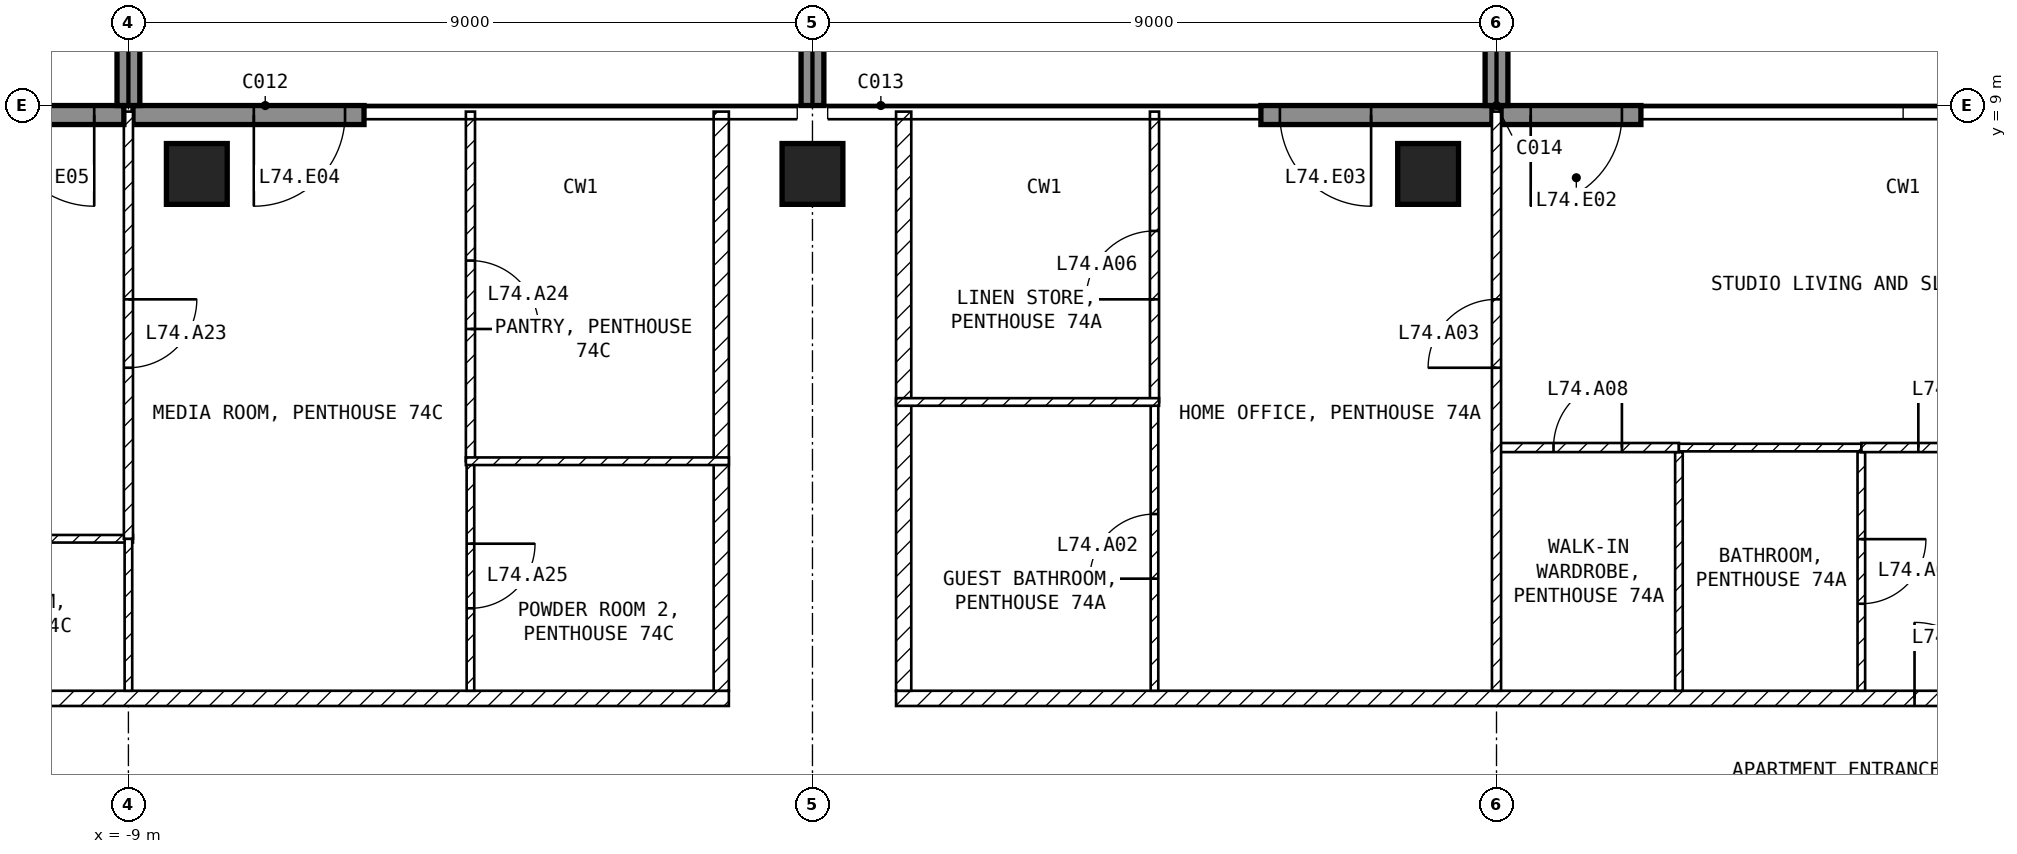
"""IFC4 building model, lengths in metres.
Left out: names, types, materials, properties, quantities, classifications, styles, units other than length and angle.
Written with IfcOpenShell. Run it as: python <this file> out.ifc"""

import sys

from ifc_helpers import new_model, si_unit, direction, frame, frame_2d, origin, origin_2d, place, context, subcontext, project, spatial, rectangle, extrude, element, fill, save


model = new_model("IFC4")
c1 = context("Model", 3, precision=1e-05, world=origin(), true_north=direction((0.0, 1.0)))
c2 = subcontext(c1, "Body", "Model", "MODEL_VIEW")
j1 = project(units=[si_unit("LENGTHUNIT", "METRE"), si_unit("PLANEANGLEUNIT", "RADIAN")], contexts=[c1])
p1 = place(None, origin())
s1 = spatial("IfcSite", under=j1, at=p1, CompositionType="ELEMENT")
p2 = place(p1, origin())
s2 = spatial("IfcBuilding", under=s1, at=p2, CompositionType="ELEMENT")
p3 = place(p2, frame((0.0, 0.0, 290.4)))
s3 = spatial("IfcBuildingStorey", under=s2, at=p3, CompositionType="ELEMENT", Elevation=290.4)
for number, where, z_axis, x_axis in (
    (1, (-8.1, 8.1, -0.25), (0.0, 0.0, 1.0), (1.0, 0.0, 0.0)),
    (2, (0.0, 8.1, -0.25), (0.0, 0.0, 1.0), (1.0, 0.0, 0.0)),
    (3, (8.1, 8.1, -0.25), (0.0, 0.0, 1.0), (1.0, 0.0, 0.0)),
):
    element("IfcColumn", number, at=place(p3, frame(where, z_axis=z_axis, x_axis=x_axis)), inside=s3, PredefinedType="COLUMN", context=c2, shape_type="SweptSolid", body=[
        extrude(rectangle(XDim=0.8, YDim=0.8, at=origin_2d()), origin(), (0.0, 0.0, 1.0), 4.2),
    ])
p4 = place(p3, frame((10.9, 8.875, 0.0), z_axis=(0.0, 0.0, 1.0), x_axis=(-1.0, 0.0, 0.0)))
e4 = element("IfcWall", 4, at=p4, inside=s3, PredefinedType="SOLIDWALL", context=c2, shape_type="SweptSolid", body=[
    extrude(rectangle(XDim=1.84, YDim=0.25, at=frame_2d((0.92, 0.0))), origin(), (0.0, 0.0, 1.0), 3.95),
])
p5 = place(p4, frame((0.25, 0.0, 0.0)))
e5 = element("IfcOpeningElement", 5, at=p5, cuts=e4, PredefinedType="OPENING", context=c2, shape_type="SweptSolid", body=[
    extrude(rectangle(XDim=1.2, YDim=2.4, at=frame_2d((0.6, 1.2))), frame((0.0, 0.135, 0.0), z_axis=(0.0, -1.0, 0.0), x_axis=(1.0, 0.0, 0.0)), (0.0, 0.0, 1.0), 0.27),
])
p6 = place(p3, frame((8.94, 8.875, 0.0), z_axis=(0.0, 0.0, 1.0), x_axis=(-1.0, 0.0, 0.0)))
e6 = element("IfcWall", 6, at=p6, inside=s3, PredefinedType="SOLIDWALL", context=c2, shape_type="SweptSolid", body=[
    extrude(rectangle(XDim=3.04, YDim=0.25, at=frame_2d((1.52, 0.0))), origin(), (0.0, 0.0, 1.0), 3.95),
])
p7 = place(p6, frame((1.59, 0.0, 0.0)))
e7 = element("IfcOpeningElement", 7, at=p7, cuts=e6, PredefinedType="OPENING", context=c2, shape_type="SweptSolid", body=[
    extrude(rectangle(XDim=1.2, YDim=2.4, at=frame_2d((0.6, 1.2))), frame((0.0, 0.135, 0.0), z_axis=(0.0, -1.0, 0.0), x_axis=(1.0, 0.0, 0.0)), (0.0, 0.0, 1.0), 0.27),
])
p8 = place(p3, frame((-5.9, 8.875, 0.0), z_axis=(0.0, 0.0, 1.0), x_axis=(-1.0, 0.0, 0.0)))
e8 = element("IfcWall", 8, at=p8, inside=s3, PredefinedType="SOLIDWALL", context=c2, shape_type="SweptSolid", body=[
    extrude(rectangle(XDim=3.04, YDim=0.25, at=frame_2d((1.52, 0.0))), origin(), (0.0, 0.0, 1.0), 3.95),
])
p9 = place(p8, frame((0.25, 0.0, 0.0)))
e9 = element("IfcOpeningElement", 9, at=p9, cuts=e8, PredefinedType="OPENING", context=c2, shape_type="SweptSolid", body=[
    extrude(rectangle(XDim=1.2, YDim=2.4, at=frame_2d((0.6, 1.2))), frame((0.0, 0.135, 0.0), z_axis=(0.0, -1.0, 0.0), x_axis=(1.0, 0.0, 0.0)), (0.0, 0.0, 1.0), 0.27),
])
p10 = place(p3, frame((-9.06, 8.875, 0.0), z_axis=(0.0, 0.0, 1.0), x_axis=(-1.0, 0.0, 0.0)))
e10 = element("IfcWall", 10, at=p10, inside=s3, PredefinedType="SOLIDWALL", context=c2, shape_type="SweptSolid", body=[
    extrude(rectangle(XDim=1.84, YDim=0.25, at=frame_2d((0.92, 0.0))), origin(), (0.0, 0.0, 1.0), 3.95),
])
p11 = place(p10, frame((0.39, 0.0, 0.0)))
e11 = element("IfcOpeningElement", 11, at=p11, cuts=e10, PredefinedType="OPENING", context=c2, shape_type="SweptSolid", body=[
    extrude(rectangle(XDim=1.2, YDim=2.4, at=frame_2d((0.6, 1.2))), frame((0.0, 0.135, 0.0), z_axis=(0.0, -1.0, 0.0), x_axis=(1.0, 0.0, 0.0)), (0.0, 0.0, 1.0), 0.27),
])
for number, where, z_axis, x_axis in (
    (12, (-9.0, 9.0, 0.0), (0.0, 0.0, 1.0), (0.0, 1.0, 0.0)),
    (13, (0.0, 9.0, 0.0), (0.0, 0.0, 1.0), (0.0, 1.0, 0.0)),
    (14, (9.0, 9.0, 0.0), (0.0, 0.0, 1.0), (0.0, 1.0, 0.0)),
):
    element("IfcWall", number, at=place(p3, frame(where, z_axis=z_axis, x_axis=x_axis)), inside=s3, PredefinedType="SOLIDWALL", context=c2, shape_type="SweptSolid", body=[
        extrude(rectangle(XDim=2.7, YDim=0.3, at=frame_2d((1.35, 0.0))), origin(), (0.0, 0.0, 1.0), 3.95),
    ])
p12 = place(p3, frame((1.1, 1.2, 0.0), z_axis=(0.0, 0.0, 1.0), x_axis=(1.0, 0.0, 0.0)))
e15 = element("IfcWall", 15, at=p12, inside=s3, PredefinedType="PARTITIONING", context=c2, shape_type="SweptSolid", body=[
    extrude(rectangle(XDim=20.5, YDim=0.2, at=frame_2d((10.25, 0.0))), origin(), (0.0, 0.0, 1.0), 3.95),
])
p13 = place(p12, frame((13.4, 0.0, 0.0)))
e16 = element("IfcOpeningElement", 16, at=p13, cuts=e15, PredefinedType="OPENING", context=c2, shape_type="SweptSolid", body=[
    extrude(rectangle(XDim=1.0, YDim=2.1, at=frame_2d((0.5, 1.05))), frame((0.0, 0.11, 0.0), z_axis=(0.0, -1.0, 0.0), x_axis=(1.0, 0.0, 0.0)), (0.0, 0.0, 1.0), 0.22),
])
p14 = place(p3, frame((1.2, 8.92, 0.0), z_axis=(0.0, 0.0, 1.0), x_axis=(0.0, -1.0, 0.0)))
e17 = element("IfcWall", 17, at=p14, inside=s3, PredefinedType="PARTITIONING", context=c2, shape_type="SweptSolid", body=[
    extrude(rectangle(XDim=7.62, YDim=0.2, at=frame_2d((3.81, 0.0))), origin(), (0.0, 0.0, 1.0), 3.95),
])
p15 = place(p3, frame((-21.6, 1.2, 0.0), z_axis=(0.0, 0.0, 1.0), x_axis=(1.0, 0.0, 0.0)))
e18 = element("IfcWall", 18, at=p15, inside=s3, PredefinedType="PARTITIONING", context=c2, shape_type="SweptSolid", body=[
    extrude(rectangle(XDim=20.5, YDim=0.2, at=frame_2d((10.25, 0.0))), origin(), (0.0, 0.0, 1.0), 3.95),
])
p16 = place(p15, frame((3.55, 0.0, 0.0)))
e19 = element("IfcOpeningElement", 19, at=p16, cuts=e18, PredefinedType="OPENING", context=c2, shape_type="SweptSolid", body=[
    extrude(rectangle(XDim=1.0, YDim=2.1, at=frame_2d((0.5, 1.05))), frame((0.0, 0.11, 0.0), z_axis=(0.0, -1.0, 0.0), x_axis=(1.0, 0.0, 0.0)), (0.0, 0.0, 1.0), 0.22),
])
p17 = place(p3, frame((-1.2, 1.3, 0.0), z_axis=(0.0, 0.0, 1.0), x_axis=(0.0, 1.0, 0.0)))
e20 = element("IfcWall", 20, at=p17, inside=s3, PredefinedType="PARTITIONING", context=c2, shape_type="SweptSolid", body=[
    extrude(rectangle(XDim=7.62, YDim=0.2, at=frame_2d((3.81, 0.0))), origin(), (0.0, 0.0, 1.0), 3.95),
])
p18 = place(p3, frame((11.4, 4.44, 0.0), z_axis=(0.0, 0.0, 1.0), x_axis=(0.0, -1.0, 0.0)))
e21 = element("IfcWall", 21, at=p18, inside=s3, PredefinedType="PARTITIONING", context=c2, shape_type="SweptSolid", body=[
    extrude(rectangle(XDim=3.14, YDim=0.1, at=frame_2d((1.57, 0.0))), origin(), (0.0, 0.0, 1.0), 3.95),
])
p19 = place(p3, frame((8.94, 4.5, 0.0), z_axis=(0.0, 0.0, 1.0), x_axis=(1.0, 0.0, 0.0)))
e22 = element("IfcWall", 22, at=p19, inside=s3, PredefinedType="PARTITIONING", context=c2, shape_type="SweptSolid", body=[
    extrude(rectangle(XDim=2.46, YDim=0.12, at=frame_2d((1.23, 0.0))), origin(), (0.0, 0.0, 1.0), 3.95),
])
p20 = place(p19, frame((0.81, 0.0, 0.0)))
e23 = element("IfcOpeningElement", 23, at=p20, cuts=e22, PredefinedType="OPENING", context=c2, shape_type="SweptSolid", body=[
    extrude(rectangle(XDim=0.9, YDim=2.1, at=frame_2d((0.45, 1.05))), frame((0.0, 0.07, 0.0), z_axis=(0.0, -1.0, 0.0), x_axis=(1.0, 0.0, 0.0)), (0.0, 0.0, 1.0), 0.14),
])
p21 = place(p3, frame((9.0, 1.3, 0.0), z_axis=(0.0, 0.0, 1.0), x_axis=(0.0, 1.0, 0.0)))
e24 = element("IfcWall", 24, at=p21, inside=s3, PredefinedType="PARTITIONING", context=c2, shape_type="SweptSolid", body=[
    extrude(rectangle(XDim=7.62, YDim=0.12, at=frame_2d((3.81, 0.0))), origin(), (0.0, 0.0, 1.0), 3.95),
])
p22 = place(p21, frame((4.25, 0.0, 0.0)))
e25 = element("IfcOpeningElement", 25, at=p22, cuts=e24, PredefinedType="OPENING", context=c2, shape_type="SweptSolid", body=[
    extrude(rectangle(XDim=0.9, YDim=2.1, at=frame_2d((0.45, 1.05))), frame((0.0, 0.07, 0.0), z_axis=(0.0, -1.0, 0.0), x_axis=(1.0, 0.0, 0.0)), (0.0, 0.0, 1.0), 0.14),
])
p23 = place(p3, frame((13.8, 4.44, 0.0), z_axis=(0.0, 0.0, 1.0), x_axis=(0.0, -1.0, 0.0)))
e26 = element("IfcWall", 26, at=p23, inside=s3, PredefinedType="PARTITIONING", context=c2, shape_type="SweptSolid", body=[
    extrude(rectangle(XDim=3.14, YDim=0.1, at=frame_2d((1.57, 0.0))), origin(), (0.0, 0.0, 1.0), 3.95),
])
p24 = place(p23, frame((1.145, 0.0, 0.0)))
e27 = element("IfcOpeningElement", 27, at=p24, cuts=e26, PredefinedType="OPENING", context=c2, shape_type="SweptSolid", body=[
    extrude(rectangle(XDim=0.85, YDim=2.1, at=frame_2d((0.425, 1.05))), frame((0.0, 0.06, 0.0), z_axis=(0.0, -1.0, 0.0), x_axis=(1.0, 0.0, 0.0)), (0.0, 0.0, 1.0), 0.12),
])
p25 = place(p3, frame((11.4, 4.5, 0.0), z_axis=(0.0, 0.0, 1.0), x_axis=(1.0, 0.0, 0.0)))
e28 = element("IfcWall", 28, at=p25, inside=s3, PredefinedType="PARTITIONING", context=c2, shape_type="SweptSolid", body=[
    extrude(rectangle(XDim=2.4, YDim=0.1, at=frame_2d((1.2, 0.0))), origin(), (0.0, 0.0, 1.0), 3.95),
])
p26 = place(p3, frame((13.8, 4.5, 0.0), z_axis=(0.0, 0.0, 1.0), x_axis=(1.0, 0.0, 0.0)))
e29 = element("IfcWall", 29, at=p26, inside=s3, PredefinedType="PARTITIONING", context=c2, shape_type="SweptSolid", body=[
    extrude(rectangle(XDim=7.8, YDim=0.12, at=frame_2d((3.9, 0.0))), origin(), (0.0, 0.0, 1.0), 3.95),
])
p27 = place(p26, frame((6.45, 0.0, 0.0)))
e30 = element("IfcOpeningElement", 30, at=p27, cuts=e29, PredefinedType="OPENING", context=c2, shape_type="SweptSolid", body=[
    extrude(rectangle(XDim=0.9, YDim=2.1, at=frame_2d((0.45, 1.05))), frame((0.0, 0.07, 0.0), z_axis=(0.0, -1.0, 0.0), x_axis=(1.0, 0.0, 0.0)), (0.0, 0.0, 1.0), 0.14),
])
p28 = place(p26, frame((0.75, 0.0, 0.0)))
e31 = element("IfcOpeningElement", 31, at=p28, cuts=e29, PredefinedType="OPENING", context=c2, shape_type="SweptSolid", body=[
    extrude(rectangle(XDim=0.9, YDim=2.1, at=frame_2d((0.45, 1.05))), frame((0.0, 0.07, 0.0), z_axis=(0.0, -1.0, 0.0), x_axis=(1.0, 0.0, 0.0)), (0.0, 0.0, 1.0), 0.14),
])
p29 = place(p3, frame((4.5, 1.3, 0.0), z_axis=(0.0, 0.0, 1.0), x_axis=(0.0, 1.0, 0.0)))
e32 = element("IfcWall", 32, at=p29, inside=s3, PredefinedType="PARTITIONING", context=c2, shape_type="SweptSolid", body=[
    extrude(rectangle(XDim=3.8, YDim=0.1, at=frame_2d((1.9, 0.0))), origin(), (0.0, 0.0, 1.0), 3.95),
])
p30 = place(p29, frame((1.475, 0.0, 0.0)))
e33 = element("IfcOpeningElement", 33, at=p30, cuts=e32, PredefinedType="OPENING", context=c2, shape_type="SweptSolid", body=[
    extrude(rectangle(XDim=0.85, YDim=2.1, at=frame_2d((0.425, 1.05))), frame((0.0, 0.06, 0.0), z_axis=(0.0, -1.0, 0.0), x_axis=(1.0, 0.0, 0.0)), (0.0, 0.0, 1.0), 0.12),
])
p31 = place(p3, frame((4.5, 5.1, 0.0), z_axis=(0.0, 0.0, 1.0), x_axis=(0.0, 1.0, 0.0)))
e34 = element("IfcWall", 34, at=p31, inside=s3, PredefinedType="PARTITIONING", context=c2, shape_type="SweptSolid", body=[
    extrude(rectangle(XDim=3.82, YDim=0.12, at=frame_2d((1.91, 0.0))), origin(), (0.0, 0.0, 1.0), 3.95),
])
p32 = place(p31, frame((1.35, 0.0, 0.0)))
e35 = element("IfcOpeningElement", 35, at=p32, cuts=e34, PredefinedType="OPENING", context=c2, shape_type="SweptSolid", body=[
    extrude(rectangle(XDim=0.9, YDim=2.1, at=frame_2d((0.45, 1.05))), frame((0.0, 0.07, 0.0), z_axis=(0.0, -1.0, 0.0), x_axis=(1.0, 0.0, 0.0)), (0.0, 0.0, 1.0), 0.14),
])
p33 = place(p3, frame((1.1, 5.1, 0.0), z_axis=(0.0, 0.0, 1.0), x_axis=(1.0, 0.0, 0.0)))
e36 = element("IfcWall", 36, at=p33, inside=s3, PredefinedType="PARTITIONING", context=c2, shape_type="SweptSolid", body=[
    extrude(rectangle(XDim=3.46, YDim=0.1, at=frame_2d((1.73, 0.0))), origin(), (0.0, 0.0, 1.0), 3.95),
])
p34 = place(p3, frame((-12.45, 3.3, 0.0), z_axis=(0.0, 0.0, 1.0), x_axis=(1.0, 0.0, 0.0)))
e37 = element("IfcWall", 37, at=p34, inside=s3, PredefinedType="PARTITIONING", context=c2, shape_type="SweptSolid", body=[
    extrude(rectangle(XDim=3.51, YDim=0.1, at=frame_2d((1.755, 0.0))), origin(), (0.0, 0.0, 1.0), 3.95),
])
p35 = place(p34, frame((1.3, 0.0, 0.0)))
e38 = element("IfcOpeningElement", 38, at=p35, cuts=e37, PredefinedType="OPENING", context=c2, shape_type="SweptSolid", body=[
    extrude(rectangle(XDim=0.85, YDim=2.1, at=frame_2d((0.425, 1.05))), frame((0.0, 0.06, 0.0), z_axis=(0.0, -1.0, 0.0), x_axis=(1.0, 0.0, 0.0)), (0.0, 0.0, 1.0), 0.12),
])
p36 = place(p3, frame((-9.0, 3.3, 0.0), z_axis=(0.0, 0.0, 1.0), x_axis=(0.0, -1.0, 0.0)))
e39 = element("IfcWall", 39, at=p36, inside=s3, PredefinedType="PARTITIONING", context=c2, shape_type="SweptSolid", body=[
    extrude(rectangle(XDim=2.0, YDim=0.1, at=frame_2d((1.0, 0.0))), origin(), (0.0, 0.0, 1.0), 3.95),
])
p37 = place(p3, frame((-9.0, 8.92, 0.0), z_axis=(0.0, 0.0, 1.0), x_axis=(0.0, -1.0, 0.0)))
e40 = element("IfcWall", 40, at=p37, inside=s3, PredefinedType="PARTITIONING", context=c2, shape_type="SweptSolid", body=[
    extrude(rectangle(XDim=5.62, YDim=0.12, at=frame_2d((2.81, 0.0))), origin(), (0.0, 0.0, 1.0), 3.95),
])
p38 = place(p37, frame((2.47, 0.0, 0.0)))
e41 = element("IfcOpeningElement", 41, at=p38, cuts=e40, PredefinedType="OPENING", context=c2, shape_type="SweptSolid", body=[
    extrude(rectangle(XDim=0.9, YDim=2.1, at=frame_2d((0.45, 1.05))), frame((0.0, 0.07, 0.0), z_axis=(0.0, -1.0, 0.0), x_axis=(1.0, 0.0, 0.0)), (0.0, 0.0, 1.0), 0.14),
])
p39 = place(p3, frame((-4.5, 4.32, 0.0), z_axis=(0.0, 0.0, 1.0), x_axis=(0.0, -1.0, 0.0)))
e42 = element("IfcWall", 42, at=p39, inside=s3, PredefinedType="PARTITIONING", context=c2, shape_type="SweptSolid", body=[
    extrude(rectangle(XDim=3.02, YDim=0.1, at=frame_2d((1.51, 0.0))), origin(), (0.0, 0.0, 1.0), 3.95),
])
p40 = place(p39, frame((1.085, 0.0, 0.0)))
e43 = element("IfcOpeningElement", 43, at=p40, cuts=e42, PredefinedType="OPENING", context=c2, shape_type="SweptSolid", body=[
    extrude(rectangle(XDim=0.85, YDim=2.1, at=frame_2d((0.425, 1.05))), frame((0.0, 0.06, 0.0), z_axis=(0.0, -1.0, 0.0), x_axis=(1.0, 0.0, 0.0)), (0.0, 0.0, 1.0), 0.12),
])
p41 = place(p3, frame((-4.5, 8.92, 0.0), z_axis=(0.0, 0.0, 1.0), x_axis=(0.0, -1.0, 0.0)))
e44 = element("IfcWall", 44, at=p41, inside=s3, PredefinedType="PARTITIONING", context=c2, shape_type="SweptSolid", body=[
    extrude(rectangle(XDim=4.6, YDim=0.12, at=frame_2d((2.3, 0.0))), origin(), (0.0, 0.0, 1.0), 3.95),
])
p42 = place(p41, frame((1.96, 0.0, 0.0)))
e45 = element("IfcOpeningElement", 45, at=p42, cuts=e44, PredefinedType="OPENING", context=c2, shape_type="SweptSolid", body=[
    extrude(rectangle(XDim=0.9, YDim=2.1, at=frame_2d((0.45, 1.05))), frame((0.0, 0.07, 0.0), z_axis=(0.0, -1.0, 0.0), x_axis=(1.0, 0.0, 0.0)), (0.0, 0.0, 1.0), 0.14),
])
p43 = place(p3, frame((-4.56, 4.32, 0.0), z_axis=(0.0, 0.0, 1.0), x_axis=(1.0, 0.0, 0.0)))
e46 = element("IfcWall", 46, at=p43, inside=s3, PredefinedType="PARTITIONING", context=c2, shape_type="SweptSolid", body=[
    extrude(rectangle(XDim=3.46, YDim=0.1, at=frame_2d((1.73, 0.0))), origin(), (0.0, 0.0, 1.0), 3.95),
])
p44 = place(p5, origin())
e47 = element("IfcDoor", 47, at=p44, inside=s3, OperationType="SINGLE_SWING_RIGHT", PredefinedType="DOOR", context=c2, shape_type="SweptSolid", body=[
    extrude(rectangle(XDim=1.2, YDim=2.4, at=frame_2d((0.6, 1.2))), frame((0.0, 0.025, 0.0), z_axis=(0.0, -1.0, 0.0), x_axis=(1.0, 0.0, 0.0)), (0.0, 0.0, 1.0), 0.05),
])
fill(e5, e47)
p45 = place(p7, origin())
e48 = element("IfcDoor", 48, at=p45, inside=s3, OperationType="SINGLE_SWING_LEFT", PredefinedType="DOOR", context=c2, shape_type="SweptSolid", body=[
    extrude(rectangle(XDim=1.2, YDim=2.4, at=frame_2d((0.6, 1.2))), frame((0.0, 0.025, 0.0), z_axis=(0.0, -1.0, 0.0), x_axis=(1.0, 0.0, 0.0)), (0.0, 0.0, 1.0), 0.05),
])
fill(e7, e48)
p46 = place(p9, origin())
e49 = element("IfcDoor", 49, at=p46, inside=s3, OperationType="SINGLE_SWING_RIGHT", PredefinedType="DOOR", context=c2, shape_type="SweptSolid", body=[
    extrude(rectangle(XDim=1.2, YDim=2.4, at=frame_2d((0.6, 1.2))), frame((0.0, 0.025, 0.0), z_axis=(0.0, -1.0, 0.0), x_axis=(1.0, 0.0, 0.0)), (0.0, 0.0, 1.0), 0.05),
])
fill(e9, e49)
p47 = place(p11, origin())
e50 = element("IfcDoor", 50, at=p47, inside=s3, OperationType="SINGLE_SWING_LEFT", PredefinedType="DOOR", context=c2, shape_type="SweptSolid", body=[
    extrude(rectangle(XDim=1.2, YDim=2.4, at=frame_2d((0.6, 1.2))), frame((0.0, 0.025, 0.0), z_axis=(0.0, -1.0, 0.0), x_axis=(1.0, 0.0, 0.0)), (0.0, 0.0, 1.0), 0.05),
])
fill(e11, e50)
p48 = place(p24, origin())
e51 = element("IfcDoor", 51, at=p48, inside=s3, OperationType="SINGLE_SWING_LEFT", PredefinedType="DOOR", context=c2, shape_type="SweptSolid", body=[
    extrude(rectangle(XDim=0.85, YDim=2.1, at=frame_2d((0.425, 1.05))), frame((0.0, 0.025, 0.0), z_axis=(0.0, -1.0, 0.0), x_axis=(1.0, 0.0, 0.0)), (0.0, 0.0, 1.0), 0.05),
])
fill(e27, e51)
p49 = place(p30, origin())
e52 = element("IfcDoor", 52, at=p49, inside=s3, OperationType="SINGLE_SWING_LEFT", PredefinedType="DOOR", context=c2, shape_type="SweptSolid", body=[
    extrude(rectangle(XDim=0.85, YDim=2.1, at=frame_2d((0.425, 1.05))), frame((0.0, 0.025, 0.0), z_axis=(0.0, -1.0, 0.0), x_axis=(1.0, 0.0, 0.0)), (0.0, 0.0, 1.0), 0.05),
])
fill(e33, e52)
p50 = place(p22, origin())
e53 = element("IfcDoor", 53, at=p50, inside=s3, OperationType="SINGLE_SWING_LEFT", PredefinedType="DOOR", context=c2, shape_type="SweptSolid", body=[
    extrude(rectangle(XDim=0.9, YDim=2.1, at=frame_2d((0.45, 1.05))), frame((0.0, 0.025, 0.0), z_axis=(0.0, -1.0, 0.0), x_axis=(1.0, 0.0, 0.0)), (0.0, 0.0, 1.0), 0.05),
])
fill(e25, e53)
p51 = place(p32, origin())
e54 = element("IfcDoor", 54, at=p51, inside=s3, OperationType="SINGLE_SWING_LEFT", PredefinedType="DOOR", context=c2, shape_type="SweptSolid", body=[
    extrude(rectangle(XDim=0.9, YDim=2.1, at=frame_2d((0.45, 1.05))), frame((0.0, 0.025, 0.0), z_axis=(0.0, -1.0, 0.0), x_axis=(1.0, 0.0, 0.0)), (0.0, 0.0, 1.0), 0.05),
])
fill(e35, e54)
p52 = place(p28, origin())
e55 = element("IfcDoor", 55, at=p52, inside=s3, OperationType="SINGLE_SWING_LEFT", PredefinedType="DOOR", context=c2, shape_type="SweptSolid", body=[
    extrude(rectangle(XDim=0.9, YDim=2.1, at=frame_2d((0.45, 1.05))), frame((0.0, 0.025, 0.0), z_axis=(0.0, -1.0, 0.0), x_axis=(1.0, 0.0, 0.0)), (0.0, 0.0, 1.0), 0.05),
])
fill(e31, e55)
p53 = place(p20, origin())
e56 = element("IfcDoor", 56, at=p53, inside=s3, OperationType="SINGLE_SWING_RIGHT", PredefinedType="DOOR", context=c2, shape_type="SweptSolid", body=[
    extrude(rectangle(XDim=0.9, YDim=2.1, at=frame_2d((0.45, 1.05))), frame((0.0, 0.025, 0.0), z_axis=(0.0, -1.0, 0.0), x_axis=(1.0, 0.0, 0.0)), (0.0, 0.0, 1.0), 0.05),
])
fill(e23, e56)
p54 = place(p38, origin())
e57 = element("IfcDoor", 57, at=p54, inside=s3, OperationType="SINGLE_SWING_LEFT", PredefinedType="DOOR", context=c2, shape_type="SweptSolid", body=[
    extrude(rectangle(XDim=0.9, YDim=2.1, at=frame_2d((0.45, 1.05))), frame((0.0, 0.025, 0.0), z_axis=(0.0, -1.0, 0.0), x_axis=(1.0, 0.0, 0.0)), (0.0, 0.0, 1.0), 0.05),
])
fill(e41, e57)
p55 = place(p42, origin())
e58 = element("IfcDoor", 58, at=p55, inside=s3, OperationType="SINGLE_SWING_RIGHT", PredefinedType="DOOR", context=c2, shape_type="SweptSolid", body=[
    extrude(rectangle(XDim=0.9, YDim=2.1, at=frame_2d((0.45, 1.05))), frame((0.0, 0.025, 0.0), z_axis=(0.0, -1.0, 0.0), x_axis=(1.0, 0.0, 0.0)), (0.0, 0.0, 1.0), 0.05),
])
fill(e45, e58)
p56 = place(p40, origin())
e59 = element("IfcDoor", 59, at=p56, inside=s3, OperationType="SINGLE_SWING_LEFT", PredefinedType="DOOR", context=c2, shape_type="SweptSolid", body=[
    extrude(rectangle(XDim=0.85, YDim=2.1, at=frame_2d((0.425, 1.05))), frame((0.0, 0.025, 0.0), z_axis=(0.0, -1.0, 0.0), x_axis=(1.0, 0.0, 0.0)), (0.0, 0.0, 1.0), 0.05),
])
fill(e43, e59)
p57 = place(p13, origin())
e60 = element("IfcDoor", 60, at=p57, inside=s3, OperationType="SINGLE_SWING_LEFT", PredefinedType="DOOR", context=c2, shape_type="SweptSolid", body=[
    extrude(rectangle(XDim=1.0, YDim=2.1, at=frame_2d((0.5, 1.05))), frame((0.0, 0.025, 0.0), z_axis=(0.0, -1.0, 0.0), x_axis=(1.0, 0.0, 0.0)), (0.0, 0.0, 1.0), 0.05),
])
fill(e16, e60)
save(model, sys.argv[1])
